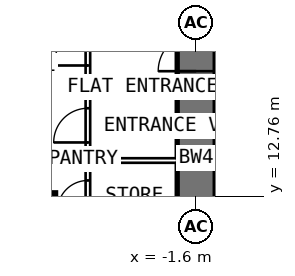
"""IFC4 building model, lengths in metres.
Left out: names, types, materials, properties, quantities, classifications, styles, units other than length and angle.
Written with IfcOpenShell. Run it as: python <this file> out.ifc"""

import sys

from ifc_helpers import new_model, si_unit, direction, frame, frame_2d, origin, origin_2d, place, context, subcontext, project, spatial, rectangle, extrude, element, fill, save


model = new_model("IFC4")
c1 = context("Model", 3, precision=1e-05, world=origin(), true_north=direction((0.0, 1.0)))
c2 = subcontext(c1, "Body", "Model", "MODEL_VIEW")
j1 = project(units=[si_unit("LENGTHUNIT", "METRE"), si_unit("PLANEANGLEUNIT", "RADIAN")], contexts=[c1])
p1 = place(None, origin())
s1 = spatial("IfcSite", under=j1, at=p1, CompositionType="ELEMENT")
p2 = place(p1, origin())
s2 = spatial("IfcBuilding", under=s1, at=p2, CompositionType="ELEMENT")
p3 = place(p2, frame((0.0, 0.0, 61.0)))
s3 = spatial("IfcBuildingStorey", under=s2, at=p3, CompositionType="ELEMENT", Elevation=61.0)
p4 = place(p3, frame((-5.9, 12.25, 0.0), z_axis=(0.0, 0.0, 1.0), x_axis=(0.0, 1.0, 0.0)))
e1 = element("IfcColumn", 1, at=p4, inside=s3, PredefinedType="COLUMN", context=c2, shape_type="SweptSolid", body=[
    extrude(rectangle(XDim=1.2, YDim=1.2, at=origin_2d()), origin(), (0.0, 0.0, 1.0), 3.6),
])
p5 = place(p3, frame((-1.6, 9.6, 0.0), z_axis=(0.0, 0.0, 1.0), x_axis=(0.0, 1.0, 0.0)))
e2 = element("IfcWall", 2, at=p5, inside=s3, PredefinedType="SHEAR", context=c2, shape_type="SweptSolid", body=[
    extrude(rectangle(XDim=8.35, YDim=1.0, at=frame_2d((4.175, 0.0))), origin(), (0.0, 0.0, 1.0), 3.6),
])
p6 = place(p5, frame((6.45, 0.0, 0.0)))
e3 = element("IfcOpeningElement", 3, at=p6, cuts=e2, PredefinedType="OPENING", context=c2, shape_type="SweptSolid", body=[
    extrude(rectangle(XDim=1.0, YDim=2.1, at=frame_2d((0.5, 1.05))), frame((0.0, 0.512, 0.0), z_axis=(0.0, -1.0, 0.0), x_axis=(1.0, 0.0, 0.0)), (0.0, 0.0, 1.0), 1.024),
])
p7 = place(p3, frame((-4.45, 10.1, 0.0), z_axis=(0.0, 0.0, 1.0), x_axis=(0.0, 1.0, 0.0)))
e4 = element("IfcWall", 4, at=p7, inside=s3, PredefinedType="PARTITIONING", context=c2, shape_type="SweptSolid", body=[
    extrude(rectangle(XDim=14.65, YDim=0.12, at=frame_2d((7.325, 0.0))), origin(), (0.0, 0.0, 1.0), 3.35),
])
p8 = place(p7, frame((0.375, 0.0, 0.0)))
e5 = element("IfcOpeningElement", 5, at=p8, cuts=e4, PredefinedType="OPENING", context=c2, shape_type="SweptSolid", body=[
    extrude(rectangle(XDim=0.9, YDim=2.1, at=frame_2d((0.45, 1.05))), frame((0.0, 0.072, 0.0), z_axis=(0.0, -1.0, 0.0), x_axis=(1.0, 0.0, 0.0)), (0.0, 0.0, 1.0), 0.144),
])
p9 = place(p7, frame((2.275, 0.0, 0.0)))
e6 = element("IfcOpeningElement", 6, at=p9, cuts=e4, PredefinedType="OPENING", context=c2, shape_type="SweptSolid", body=[
    extrude(rectangle(XDim=0.8, YDim=2.1, at=frame_2d((0.4, 1.05))), frame((0.0, 0.072, 0.0), z_axis=(0.0, -1.0, 0.0), x_axis=(1.0, 0.0, 0.0)), (0.0, 0.0, 1.0), 0.144),
])
p10 = place(p7, frame((4.075, 0.0, 0.0)))
e7 = element("IfcOpeningElement", 7, at=p10, cuts=e4, PredefinedType="OPENING", context=c2, shape_type="SweptSolid", body=[
    extrude(rectangle(XDim=0.9, YDim=2.1, at=frame_2d((0.45, 1.05))), frame((0.0, 0.072, 0.0), z_axis=(0.0, -1.0, 0.0), x_axis=(1.0, 0.0, 0.0)), (0.0, 0.0, 1.0), 0.144),
])
p11 = place(p7, frame((6.1, 0.0, 0.0)))
e8 = element("IfcOpeningElement", 8, at=p11, cuts=e4, PredefinedType="OPENING", context=c2, shape_type="SweptSolid", body=[
    extrude(rectangle(XDim=0.9, YDim=2.1, at=frame_2d((0.45, 1.05))), frame((0.0, 0.072, 0.0), z_axis=(0.0, -1.0, 0.0), x_axis=(1.0, 0.0, 0.0)), (0.0, 0.0, 1.0), 0.144),
])
p12 = place(p7, frame((8.729, 0.0, 0.0)))
e9 = element("IfcOpeningElement", 9, at=p12, cuts=e4, PredefinedType="OPENING", context=c2, shape_type="SweptSolid", body=[
    extrude(rectangle(XDim=0.8, YDim=2.1, at=frame_2d((0.4, 1.05))), frame((0.0, 0.072, 0.0), z_axis=(0.0, -1.0, 0.0), x_axis=(1.0, 0.0, 0.0)), (0.0, 0.0, 1.0), 0.144),
])
p13 = place(p7, frame((11.193, 0.0, 0.0)))
e10 = element("IfcOpeningElement", 10, at=p13, cuts=e4, PredefinedType="OPENING", context=c2, shape_type="SweptSolid", body=[
    extrude(rectangle(XDim=0.8, YDim=2.1, at=frame_2d((0.4, 1.05))), frame((0.0, 0.072, 0.0), z_axis=(0.0, -1.0, 0.0), x_axis=(1.0, 0.0, 0.0)), (0.0, 0.0, 1.0), 0.144),
])
p14 = place(p7, frame((13.114, 0.0, 0.0)))
e11 = element("IfcOpeningElement", 11, at=p14, cuts=e4, PredefinedType="OPENING", context=c2, shape_type="SweptSolid", body=[
    extrude(rectangle(XDim=0.9, YDim=2.1, at=frame_2d((0.45, 1.05))), frame((0.0, 0.072, 0.0), z_axis=(0.0, -1.0, 0.0), x_axis=(1.0, 0.0, 0.0)), (0.0, 0.0, 1.0), 0.144),
])
for number, where, z_axis, x_axis in (
    (12, (-2.1, 13.7, 0.0), (0.0, 0.0, 1.0), (-1.0, 0.0, 0.0)),
    (13, (-2.1, 15.55, 0.0), (0.0, 0.0, 1.0), (-1.0, 0.0, 0.0)),
):
    element("IfcWall", number, at=place(p3, frame(where, z_axis=z_axis, x_axis=x_axis)), inside=s3, PredefinedType="PARTITIONING", context=c2, shape_type="SweptSolid", body=[
        extrude(rectangle(XDim=2.29, YDim=0.12, at=frame_2d((1.145, 0.0))), origin(), (0.0, 0.0, 1.0), 3.35),
    ])
p15 = place(p6, origin())
e14 = element("IfcDoor", 14, at=p15, inside=s3, OperationType="SINGLE_SWING_LEFT", PredefinedType="DOOR", context=c2, shape_type="SweptSolid", body=[
    extrude(rectangle(XDim=1.0, YDim=2.1, at=frame_2d((0.5, 1.05))), frame((0.0, 0.25, 0.0), z_axis=(0.0, -1.0, 0.0), x_axis=(1.0, 0.0, 0.0)), (0.0, 0.0, 1.0), 0.5),
])
fill(e3, e14)
p16 = place(p9, origin())
e15 = element("IfcDoor", 15, at=p16, inside=s3, OperationType="SINGLE_SWING_LEFT", PredefinedType="DOOR", context=c2, shape_type="SweptSolid", body=[
    extrude(rectangle(XDim=0.8, YDim=2.1, at=frame_2d((0.4, 1.05))), frame((0.0, 0.025, 0.0), z_axis=(0.0, -1.0, 0.0), x_axis=(1.0, 0.0, 0.0)), (0.0, 0.0, 1.0), 0.05),
])
fill(e6, e15)
p17 = place(p10, origin())
e16 = element("IfcDoor", 16, at=p17, inside=s3, OperationType="SINGLE_SWING_LEFT", PredefinedType="DOOR", context=c2, shape_type="SweptSolid", body=[
    extrude(rectangle(XDim=0.9, YDim=2.1, at=frame_2d((0.45, 1.05))), frame((0.0, 0.025, 0.0), z_axis=(0.0, -1.0, 0.0), x_axis=(1.0, 0.0, 0.0)), (0.0, 0.0, 1.0), 0.05),
])
fill(e7, e16)
p18 = place(p11, origin())
e17 = element("IfcDoor", 17, at=p18, inside=s3, OperationType="SINGLE_SWING_LEFT", PredefinedType="DOOR", context=c2, shape_type="SweptSolid", body=[
    extrude(rectangle(XDim=0.9, YDim=2.1, at=frame_2d((0.45, 1.05))), frame((0.0, 0.025, 0.0), z_axis=(0.0, -1.0, 0.0), x_axis=(1.0, 0.0, 0.0)), (0.0, 0.0, 1.0), 0.05),
])
fill(e8, e17)
save(model, sys.argv[1])
